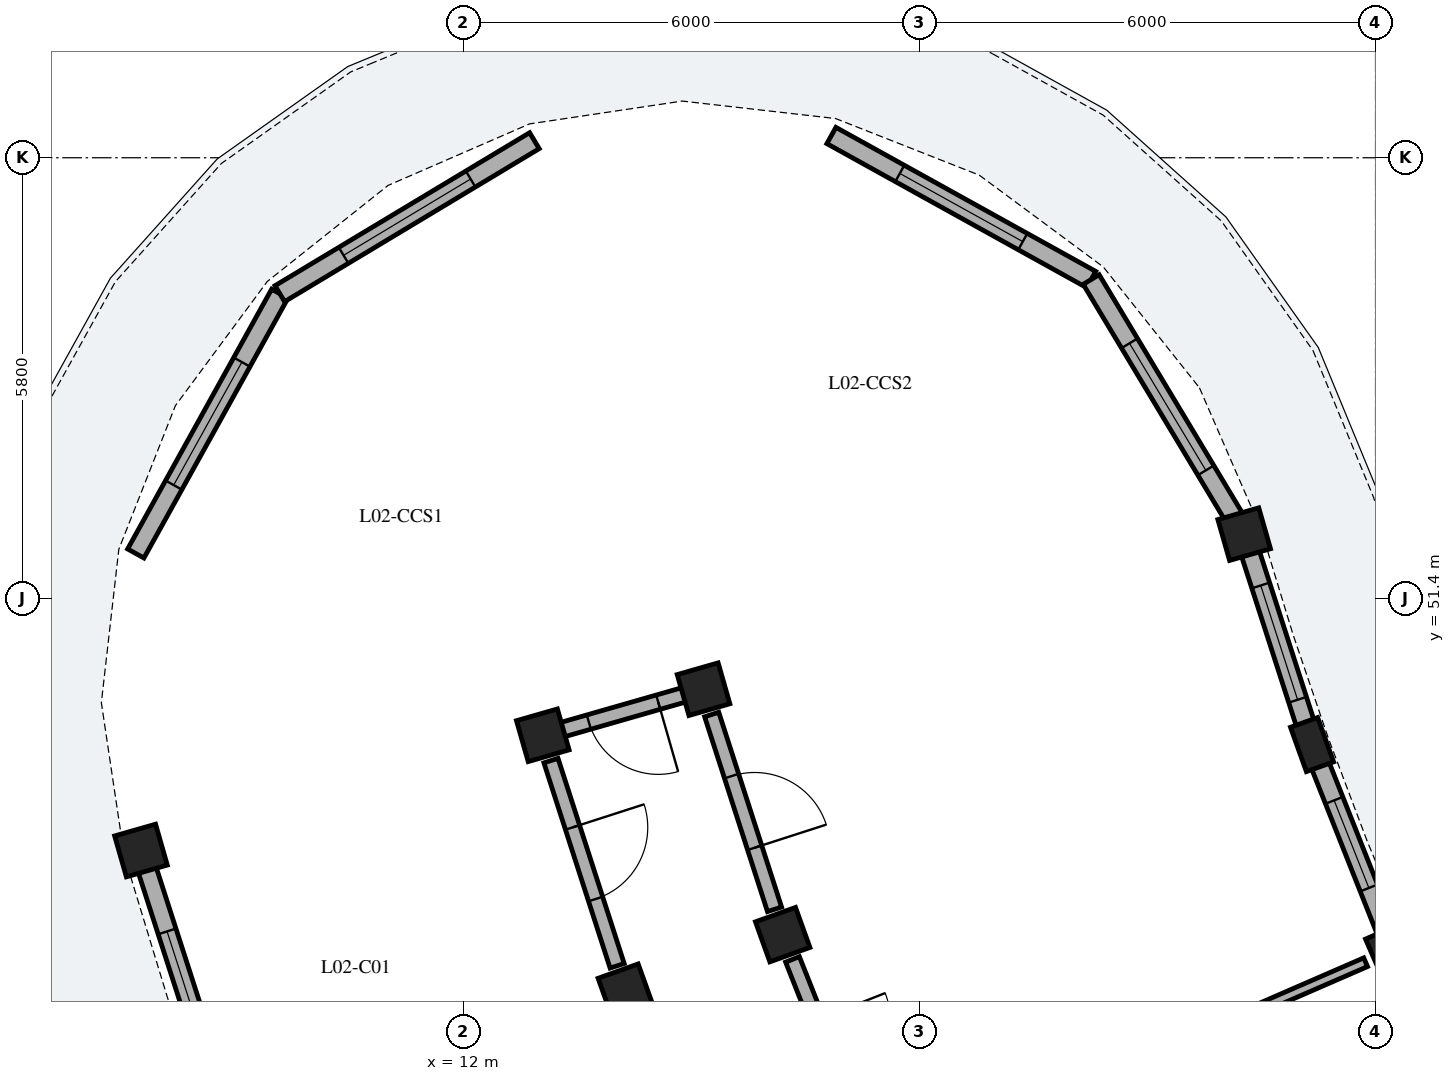
"""IFC4 building model, lengths in metres.
Left out: names, types, materials, properties, quantities, classifications, styles, units other than length and angle.
Written with IfcOpenShell. Run it as: python <this file> out.ifc"""

import sys

from ifc_helpers import new_model, si_unit, direction, frame, frame_2d, origin, origin_2d, place, context, subcontext, project, spatial, rectangle, extrude, element, fill, save


model = new_model("IFC4")
c1 = context("Model", 3, precision=1e-05, world=origin(), true_north=direction((0.0, 1.0)))
c2 = subcontext(c1, "Body", "Model", "MODEL_VIEW")
j1 = project(units=[si_unit("LENGTHUNIT", "METRE"), si_unit("PLANEANGLEUNIT", "RADIAN")], contexts=[c1])
p1 = place(None, origin())
s1 = spatial("IfcSite", under=j1, at=p1, CompositionType="ELEMENT")
p2 = place(p1, origin())
s2 = spatial("IfcBuilding", under=s1, at=p2, CompositionType="ELEMENT")
p3 = place(p2, frame((0.0, 0.0, 8.84)))
s3 = spatial("IfcBuildingStorey", under=s2, at=p3, CompositionType="ELEMENT", Elevation=8.84)
for number, where, z_axis, x_axis in (
    (1, (22.272, 52.248, 0.0), (0.0, 0.0, 1.0), (-0.961, -0.276, 0.0)),
    (2, (15.159, 50.208, 0.0), (0.0, 0.0, 1.0), (-0.961, -0.276, 0.0)),
    (3, (13.044, 49.602, 0.0), (0.0, 0.0, 1.0), (-0.961, -0.276, 0.0)),
    (4, (7.757, 48.086, 0.0), (0.0, 0.0, 1.0), (-0.961, -0.276, 0.0)),
):
    element("IfcColumn", number, at=place(p3, frame(where, z_axis=z_axis, x_axis=x_axis)), inside=s3, PredefinedType="COLUMN", context=c2, shape_type="SweptSolid", body=[
        extrude(rectangle(XDim=0.56, YDim=0.56, at=origin_2d()), origin(), (0.0, 0.0, 1.0), 3.105),
    ])
p4 = place(p3, frame((23.165, 49.479, 0.0), z_axis=(0.0, 0.0, 1.0), x_axis=(-0.941176015256, -0.337916718003, 0.0)))
e5 = element("IfcColumn", 5, at=p4, inside=s3, PredefinedType="PILASTER", context=c2, shape_type="SweptSolid", body=[
    extrude(rectangle(XDim=0.38, YDim=0.62, at=origin_2d()), origin(), (0.0, 0.0, 1.0), 3.105),
])
for number, where, z_axis, x_axis in (
    (6, (16.2, 46.979, 0.0), (0.0, 0.0, 1.0), (-0.941, -0.338, 0.0)),
    (7, (14.129, 46.236, 0.0), (0.0, 0.0, 1.0), (-0.941, -0.338, 0.0)),
    (8, (24.237, 46.776, 0.0), (0.0, 0.0, 1.0), (-0.917, -0.399, 0.0)),
):
    element("IfcColumn", number, at=place(p3, frame(where, z_axis=z_axis, x_axis=x_axis)), inside=s3, PredefinedType="COLUMN", context=c2, shape_type="SweptSolid", body=[
        extrude(rectangle(XDim=0.56, YDim=0.56, at=origin_2d()), origin(), (0.0, 0.0, 1.0), 3.105),
    ])
p5 = place(p3, frame((7.833, 47.848, 0.0), z_axis=(0.0, 0.0, 1.0), x_axis=(0.306949591136, -0.951725773793, 0.0)))
e9 = element("IfcWall", 9, at=p5, inside=s3, PredefinedType="SOLIDWALL", context=c2, shape_type="SweptSolid", body=[
    extrude(rectangle(XDim=3.487, YDim=0.245, at=frame_2d((1.743, 0.0))), origin(), (0.0, 0.0, 1.0), 2.355),
])
p6 = place(p5, frame((0.868, 0.0, 0.35)))
e10 = element("IfcOpeningElement", 10, at=p6, cuts=e9, PredefinedType="OPENING", context=c2, shape_type="SweptSolid", body=[
    extrude(rectangle(XDim=1.75, YDim=1.85, at=frame_2d((0.875, 0.925))), frame((0.0, 0.133, 0.0), z_axis=(0.0, -1.0, 0.0), x_axis=(1.0, 0.0, 0.0)), (0.0, 0.0, 1.0), 0.265),
])
p7 = place(p3, frame((22.349, 52.01, 0.0), z_axis=(0.0, 0.0, 1.0), x_axis=(0.306979942778, -0.951715984279, 0.0)))
e11 = element("IfcWall", 11, at=p7, inside=s3, PredefinedType="SOLIDWALL", context=c2, shape_type="SweptSolid", body=[
    extrude(rectangle(XDim=2.499, YDim=0.245, at=frame_2d((1.25, 0.0))), origin(), (0.0, 0.0, 1.0), 2.355),
])
p8 = place(p7, frame((0.459, 0.0, 0.35)))
e12 = element("IfcOpeningElement", 12, at=p8, cuts=e11, PredefinedType="OPENING", context=c2, shape_type="SweptSolid", body=[
    extrude(rectangle(XDim=1.58, YDim=1.68, at=frame_2d((0.79, 0.84))), frame((0.0, 0.133, 0.0), z_axis=(0.0, -1.0, 0.0), x_axis=(1.0, 0.0, 0.0)), (0.0, 0.0, 1.0), 0.265),
])
p9 = place(p3, frame((23.224, 49.331, 0.0), z_axis=(0.0, 0.0, 1.0), x_axis=(0.368558756085, -0.9296044553, 0.0)))
e13 = element("IfcWall", 13, at=p9, inside=s3, PredefinedType="SOLIDWALL", context=c2, shape_type="SweptSolid", body=[
    extrude(rectangle(XDim=2.499, YDim=0.245, at=frame_2d((1.249, 0.0))), origin(), (0.0, 0.0, 1.0), 2.355),
])
p10 = place(p9, frame((0.629, 0.0, 0.55)))
e14 = element("IfcOpeningElement", 14, at=p10, cuts=e13, PredefinedType="OPENING", context=c2, shape_type="SweptSolid", body=[
    extrude(rectangle(XDim=1.24, YDim=1.535, at=frame_2d((0.62, 0.768))), frame((0.0, 0.133, 0.0), z_axis=(0.0, -1.0, 0.0), x_axis=(1.0, 0.0, 0.0)), (0.0, 0.0, 1.0), 0.265),
])
p11 = place(p3, frame((7.689, 51.993, 0.0), z_axis=(0.0, 0.0, 1.0), x_axis=(0.48481530532, 0.874616555828, 0.0)))
e15 = element("IfcWall", 15, at=p11, inside=s3, PredefinedType="SOLIDWALL", context=c2, shape_type="SweptSolid", body=[
    extrude(rectangle(XDim=3.908, YDim=0.245, at=frame_2d((1.954, 0.0))), origin(), (0.0, 0.0, 1.0), 2.355),
])
p12 = place(p11, frame((1.029, 0.0, 0.4)))
e16 = element("IfcOpeningElement", 16, at=p12, cuts=e15, PredefinedType="OPENING", context=c2, shape_type="SweptSolid", body=[
    extrude(rectangle(XDim=1.85, YDim=1.72, at=frame_2d((0.925, 0.86))), frame((0.0, 0.133, 0.0), z_axis=(0.0, -1.0, 0.0), x_axis=(1.0, 0.0, 0.0)), (0.0, 0.0, 1.0), 0.265),
])
p13 = place(p3, frame((9.583, 55.412, 0.0), z_axis=(0.0, 0.0, 1.0), x_axis=(0.857178568309, 0.515019321998, 0.0)))
e17 = element("IfcWall", 17, at=p13, inside=s3, PredefinedType="SOLIDWALL", context=c2, shape_type="SweptSolid", body=[
    extrude(rectangle(XDim=3.908, YDim=0.245, at=frame_2d((1.954, 0.0))), origin(), (0.0, 0.0, 1.0), 2.355),
])
p14 = place(p13, frame((0.979, 0.0, 0.4)))
e18 = element("IfcOpeningElement", 18, at=p14, cuts=e17, PredefinedType="OPENING", context=c2, shape_type="SweptSolid", body=[
    extrude(rectangle(XDim=1.95, YDim=1.78, at=frame_2d((0.975, 0.89))), frame((0.0, 0.133, 0.0), z_axis=(0.0, -1.0, 0.0), x_axis=(1.0, 0.0, 0.0)), (0.0, 0.0, 1.0), 0.265),
])
p15 = place(p3, frame((16.841, 57.493, 0.0), z_axis=(0.0, 0.0, 1.0), x_axis=(0.874616555828, -0.48481530532, 0.0)))
e19 = element("IfcWall", 19, at=p15, inside=s3, PredefinedType="SOLIDWALL", context=c2, shape_type="SweptSolid", body=[
    extrude(rectangle(XDim=3.908, YDim=0.245, at=frame_2d((1.954, 0.0))), origin(), (0.0, 0.0, 1.0), 2.355),
])
p16 = place(p15, frame((1.029, 0.0, 0.4)))
e20 = element("IfcOpeningElement", 20, at=p16, cuts=e19, PredefinedType="OPENING", context=c2, shape_type="SweptSolid", body=[
    extrude(rectangle(XDim=1.85, YDim=1.72, at=frame_2d((0.925, 0.86))), frame((0.0, 0.133, 0.0), z_axis=(0.0, -1.0, 0.0), x_axis=(1.0, 0.0, 0.0)), (0.0, 0.0, 1.0), 0.265),
])
p17 = place(p3, frame((20.259, 55.598, 0.0), z_axis=(0.0, 0.0, 1.0), x_axis=(0.515037642827, -0.857167560324, 0.0)))
e21 = element("IfcWall", 21, at=p17, inside=s3, PredefinedType="SOLIDWALL", context=c2, shape_type="SweptSolid", body=[
    extrude(rectangle(XDim=3.908, YDim=0.245, at=frame_2d((1.954, 0.0))), origin(), (0.0, 0.0, 1.0), 2.355),
])
p18 = place(p17, frame((0.979, 0.0, 0.4)))
e22 = element("IfcOpeningElement", 22, at=p18, cuts=e21, PredefinedType="OPENING", context=c2, shape_type="SweptSolid", body=[
    extrude(rectangle(XDim=1.95, YDim=1.78, at=frame_2d((0.975, 0.89))), frame((0.0, 0.133, 0.0), z_axis=(0.0, -1.0, 0.0), x_axis=(1.0, 0.0, 0.0)), (0.0, 0.0, 1.0), 0.265),
])
p19 = place(p3, frame((13.151, 49.269, 0.0), z_axis=(0.0, 0.0, 1.0), x_axis=(0.30694495224, -0.951727269912, 0.0)))
e23 = element("IfcWall", 23, at=p19, inside=s3, PredefinedType="PARTITIONING", context=c2, shape_type="SweptSolid", body=[
    extrude(rectangle(XDim=2.837, YDim=0.195, at=frame_2d((1.418, 0.0))), origin(), (0.0, 0.0, 1.0), 2.37),
])
p20 = place(p19, frame((0.924, 0.0, 0.0)))
e24 = element("IfcOpeningElement", 24, at=p20, cuts=e23, PredefinedType="OPENING", context=c2, shape_type="SweptSolid", body=[
    extrude(rectangle(XDim=0.99, YDim=2.16, at=frame_2d((0.495, 1.08))), frame((0.0, 0.107, 0.0), z_axis=(0.0, -1.0, 0.0), x_axis=(1.0, 0.0, 0.0)), (0.0, 0.0, 1.0), 0.215),
])
p21 = place(p3, frame((15.266, 49.875, 0.0), z_axis=(0.0, 0.0, 1.0), x_axis=(0.306883578189, -0.951747061691, 0.0)))
e25 = element("IfcWall", 25, at=p21, inside=s3, PredefinedType="PARTITIONING", context=c2, shape_type="SweptSolid", body=[
    extrude(rectangle(XDim=2.693, YDim=0.195, at=frame_2d((1.346, 0.0))), origin(), (0.0, 0.0, 1.0), 2.37),
])
p22 = place(p21, frame((0.852, 0.0, 0.0)))
e26 = element("IfcOpeningElement", 26, at=p22, cuts=e25, PredefinedType="OPENING", context=c2, shape_type="SweptSolid", body=[
    extrude(rectangle(XDim=0.99, YDim=2.16, at=frame_2d((0.495, 1.08))), frame((0.0, 0.107, 0.0), z_axis=(0.0, -1.0, 0.0), x_axis=(1.0, 0.0, 0.0)), (0.0, 0.0, 1.0), 0.215),
])
p23 = place(p3, frame((16.329, 46.654, 0.0), z_axis=(0.0, 0.0, 1.0), x_axis=(0.368528468945, -0.929616462622, 0.0)))
e27 = element("IfcWall", 27, at=p23, inside=s3, PredefinedType="PARTITIONING", context=c2, shape_type="SweptSolid", body=[
    extrude(rectangle(XDim=2.693, YDim=0.195, at=frame_2d((1.346, 0.0))), origin(), (0.0, 0.0, 1.0), 2.37),
])
p24 = place(p23, frame((0.862, 0.0, 0.0)))
e28 = element("IfcOpeningElement", 28, at=p24, cuts=e27, PredefinedType="OPENING", context=c2, shape_type="SweptSolid", body=[
    extrude(rectangle(XDim=0.97, YDim=2.15, at=frame_2d((0.485, 1.075))), frame((0.0, 0.107, 0.0), z_axis=(0.0, -1.0, 0.0), x_axis=(1.0, 0.0, 0.0)), (0.0, 0.0, 1.0), 0.215),
])
p25 = place(p3, frame((23.87, 46.616, 0.0), z_axis=(0.0, 0.0, 1.0), x_axis=(-0.9170582943, -0.398753162817, 0.0)))
e29 = element("IfcWall", 29, at=p25, inside=s3, PredefinedType="PARTITIONING", context=c2, shape_type="SweptSolid", body=[
    extrude(rectangle(XDim=6.6, YDim=0.125, at=frame_2d((3.3, 0.0))), origin(), (0.0, 0.0, 1.0), 2.37),
])
p26 = place(p25, frame((2.855, 0.0, 0.0)))
e30 = element("IfcOpeningElement", 30, at=p26, cuts=e29, PredefinedType="OPENING", context=c2, shape_type="SweptSolid", body=[
    extrude(rectangle(XDim=0.89, YDim=2.1, at=frame_2d((0.445, 1.05))), frame((0.0, 0.073, 0.0), z_axis=(0.0, -1.0, 0.0), x_axis=(1.0, 0.0, 0.0)), (0.0, 0.0, 1.0), 0.145),
])
p27 = place(p3, frame((15.111, 50.194, 0.0), z_axis=(0.0, 0.0, 1.0), x_axis=(-0.961264701934, -0.275626872449, 0.0)))
e31 = element("IfcWall", 31, at=p27, inside=s3, PredefinedType="PARTITIONING", context=c2, shape_type="SweptSolid", body=[
    extrude(rectangle(XDim=2.1, YDim=0.195, at=frame_2d((1.05, 0.0))), origin(), (0.0, 0.0, 1.0), 2.37),
])
p28 = place(p27, frame((0.57, 0.0, 0.0)))
e32 = element("IfcOpeningElement", 32, at=p28, cuts=e31, PredefinedType="OPENING", context=c2, shape_type="SweptSolid", body=[
    extrude(rectangle(XDim=0.95, YDim=2.13, at=frame_2d((0.475, 1.065))), frame((0.0, 0.107, 0.0), z_axis=(0.0, -1.0, 0.0), x_axis=(1.0, 0.0, 0.0)), (0.0, 0.0, 1.0), 0.215),
])
p29 = place(p6, origin())
e33 = element("IfcWindow", 33, at=p29, inside=s3, PartitioningType="SINGLE_PANEL", PredefinedType="WINDOW", context=c2, shape_type="SweptSolid", body=[
    extrude(rectangle(XDim=1.75, YDim=1.85, at=frame_2d((0.875, 0.925))), frame((0.0, 0.03, 0.0), z_axis=(0.0, -1.0, 0.0), x_axis=(1.0, 0.0, 0.0)), (0.0, 0.0, 1.0), 0.06),
])
fill(e10, e33)
p30 = place(p8, origin())
e34 = element("IfcWindow", 34, at=p30, inside=s3, PartitioningType="SINGLE_PANEL", PredefinedType="WINDOW", context=c2, shape_type="SweptSolid", body=[
    extrude(rectangle(XDim=1.58, YDim=1.68, at=frame_2d((0.79, 0.84))), frame((0.0, 0.03, 0.0), z_axis=(0.0, -1.0, 0.0), x_axis=(1.0, 0.0, 0.0)), (0.0, 0.0, 1.0), 0.06),
])
fill(e12, e34)
p31 = place(p10, origin())
e35 = element("IfcWindow", 35, at=p31, inside=s3, PartitioningType="SINGLE_PANEL", PredefinedType="WINDOW", context=c2, shape_type="SweptSolid", body=[
    extrude(rectangle(XDim=1.24, YDim=1.535, at=frame_2d((0.62, 0.768))), frame((0.0, 0.03, 0.0), z_axis=(0.0, -1.0, 0.0), x_axis=(1.0, 0.0, 0.0)), (0.0, 0.0, 1.0), 0.06),
])
fill(e14, e35)
p32 = place(p12, origin())
e36 = element("IfcWindow", 36, at=p32, inside=s3, PartitioningType="SINGLE_PANEL", PredefinedType="WINDOW", context=c2, shape_type="SweptSolid", body=[
    extrude(rectangle(XDim=1.85, YDim=1.72, at=frame_2d((0.925, 0.86))), frame((0.0, 0.03, 0.0), z_axis=(0.0, -1.0, 0.0), x_axis=(1.0, 0.0, 0.0)), (0.0, 0.0, 1.0), 0.06),
])
fill(e16, e36)
p33 = place(p14, origin())
e37 = element("IfcWindow", 37, at=p33, inside=s3, PartitioningType="SINGLE_PANEL", PredefinedType="WINDOW", context=c2, shape_type="SweptSolid", body=[
    extrude(rectangle(XDim=1.95, YDim=1.78, at=frame_2d((0.975, 0.89))), frame((0.0, 0.03, 0.0), z_axis=(0.0, -1.0, 0.0), x_axis=(1.0, 0.0, 0.0)), (0.0, 0.0, 1.0), 0.06),
])
fill(e18, e37)
p34 = place(p16, origin())
e38 = element("IfcWindow", 38, at=p34, inside=s3, PartitioningType="SINGLE_PANEL", PredefinedType="WINDOW", context=c2, shape_type="SweptSolid", body=[
    extrude(rectangle(XDim=1.85, YDim=1.72, at=frame_2d((0.925, 0.86))), frame((0.0, 0.03, 0.0), z_axis=(0.0, -1.0, 0.0), x_axis=(1.0, 0.0, 0.0)), (0.0, 0.0, 1.0), 0.06),
])
fill(e20, e38)
p35 = place(p18, origin())
e39 = element("IfcWindow", 39, at=p35, inside=s3, PartitioningType="SINGLE_PANEL", PredefinedType="WINDOW", context=c2, shape_type="SweptSolid", body=[
    extrude(rectangle(XDim=1.95, YDim=1.78, at=frame_2d((0.975, 0.89))), frame((0.0, 0.03, 0.0), z_axis=(0.0, -1.0, 0.0), x_axis=(1.0, 0.0, 0.0)), (0.0, 0.0, 1.0), 0.06),
])
fill(e22, e39)
p36 = place(p20, origin())
e40 = element("IfcDoor", 40, at=p36, inside=s3, OperationType="SINGLE_SWING_LEFT", PredefinedType="DOOR", context=c2, shape_type="SweptSolid", body=[
    extrude(rectangle(XDim=0.99, YDim=2.16, at=frame_2d((0.495, 1.08))), frame((0.0, 0.025, 0.0), z_axis=(0.0, -1.0, 0.0), x_axis=(1.0, 0.0, 0.0)), (0.0, 0.0, 1.0), 0.05),
])
fill(e24, e40)
p37 = place(p22, origin())
e41 = element("IfcDoor", 41, at=p37, inside=s3, OperationType="SINGLE_SWING_RIGHT", PredefinedType="DOOR", context=c2, shape_type="SweptSolid", body=[
    extrude(rectangle(XDim=0.99, YDim=2.16, at=frame_2d((0.495, 1.08))), frame((0.0, 0.025, 0.0), z_axis=(0.0, -1.0, 0.0), x_axis=(1.0, 0.0, 0.0)), (0.0, 0.0, 1.0), 0.05),
])
fill(e26, e41)
p38 = place(p28, origin())
e42 = element("IfcDoor", 42, at=p38, inside=s3, OperationType="SINGLE_SWING_LEFT", PredefinedType="DOOR", context=c2, shape_type="SweptSolid", body=[
    extrude(rectangle(XDim=0.95, YDim=2.13, at=frame_2d((0.475, 1.065))), frame((0.0, 0.025, 0.0), z_axis=(0.0, -1.0, 0.0), x_axis=(1.0, 0.0, 0.0)), (0.0, 0.0, 1.0), 0.05),
])
fill(e32, e42)
save(model, sys.argv[1])
